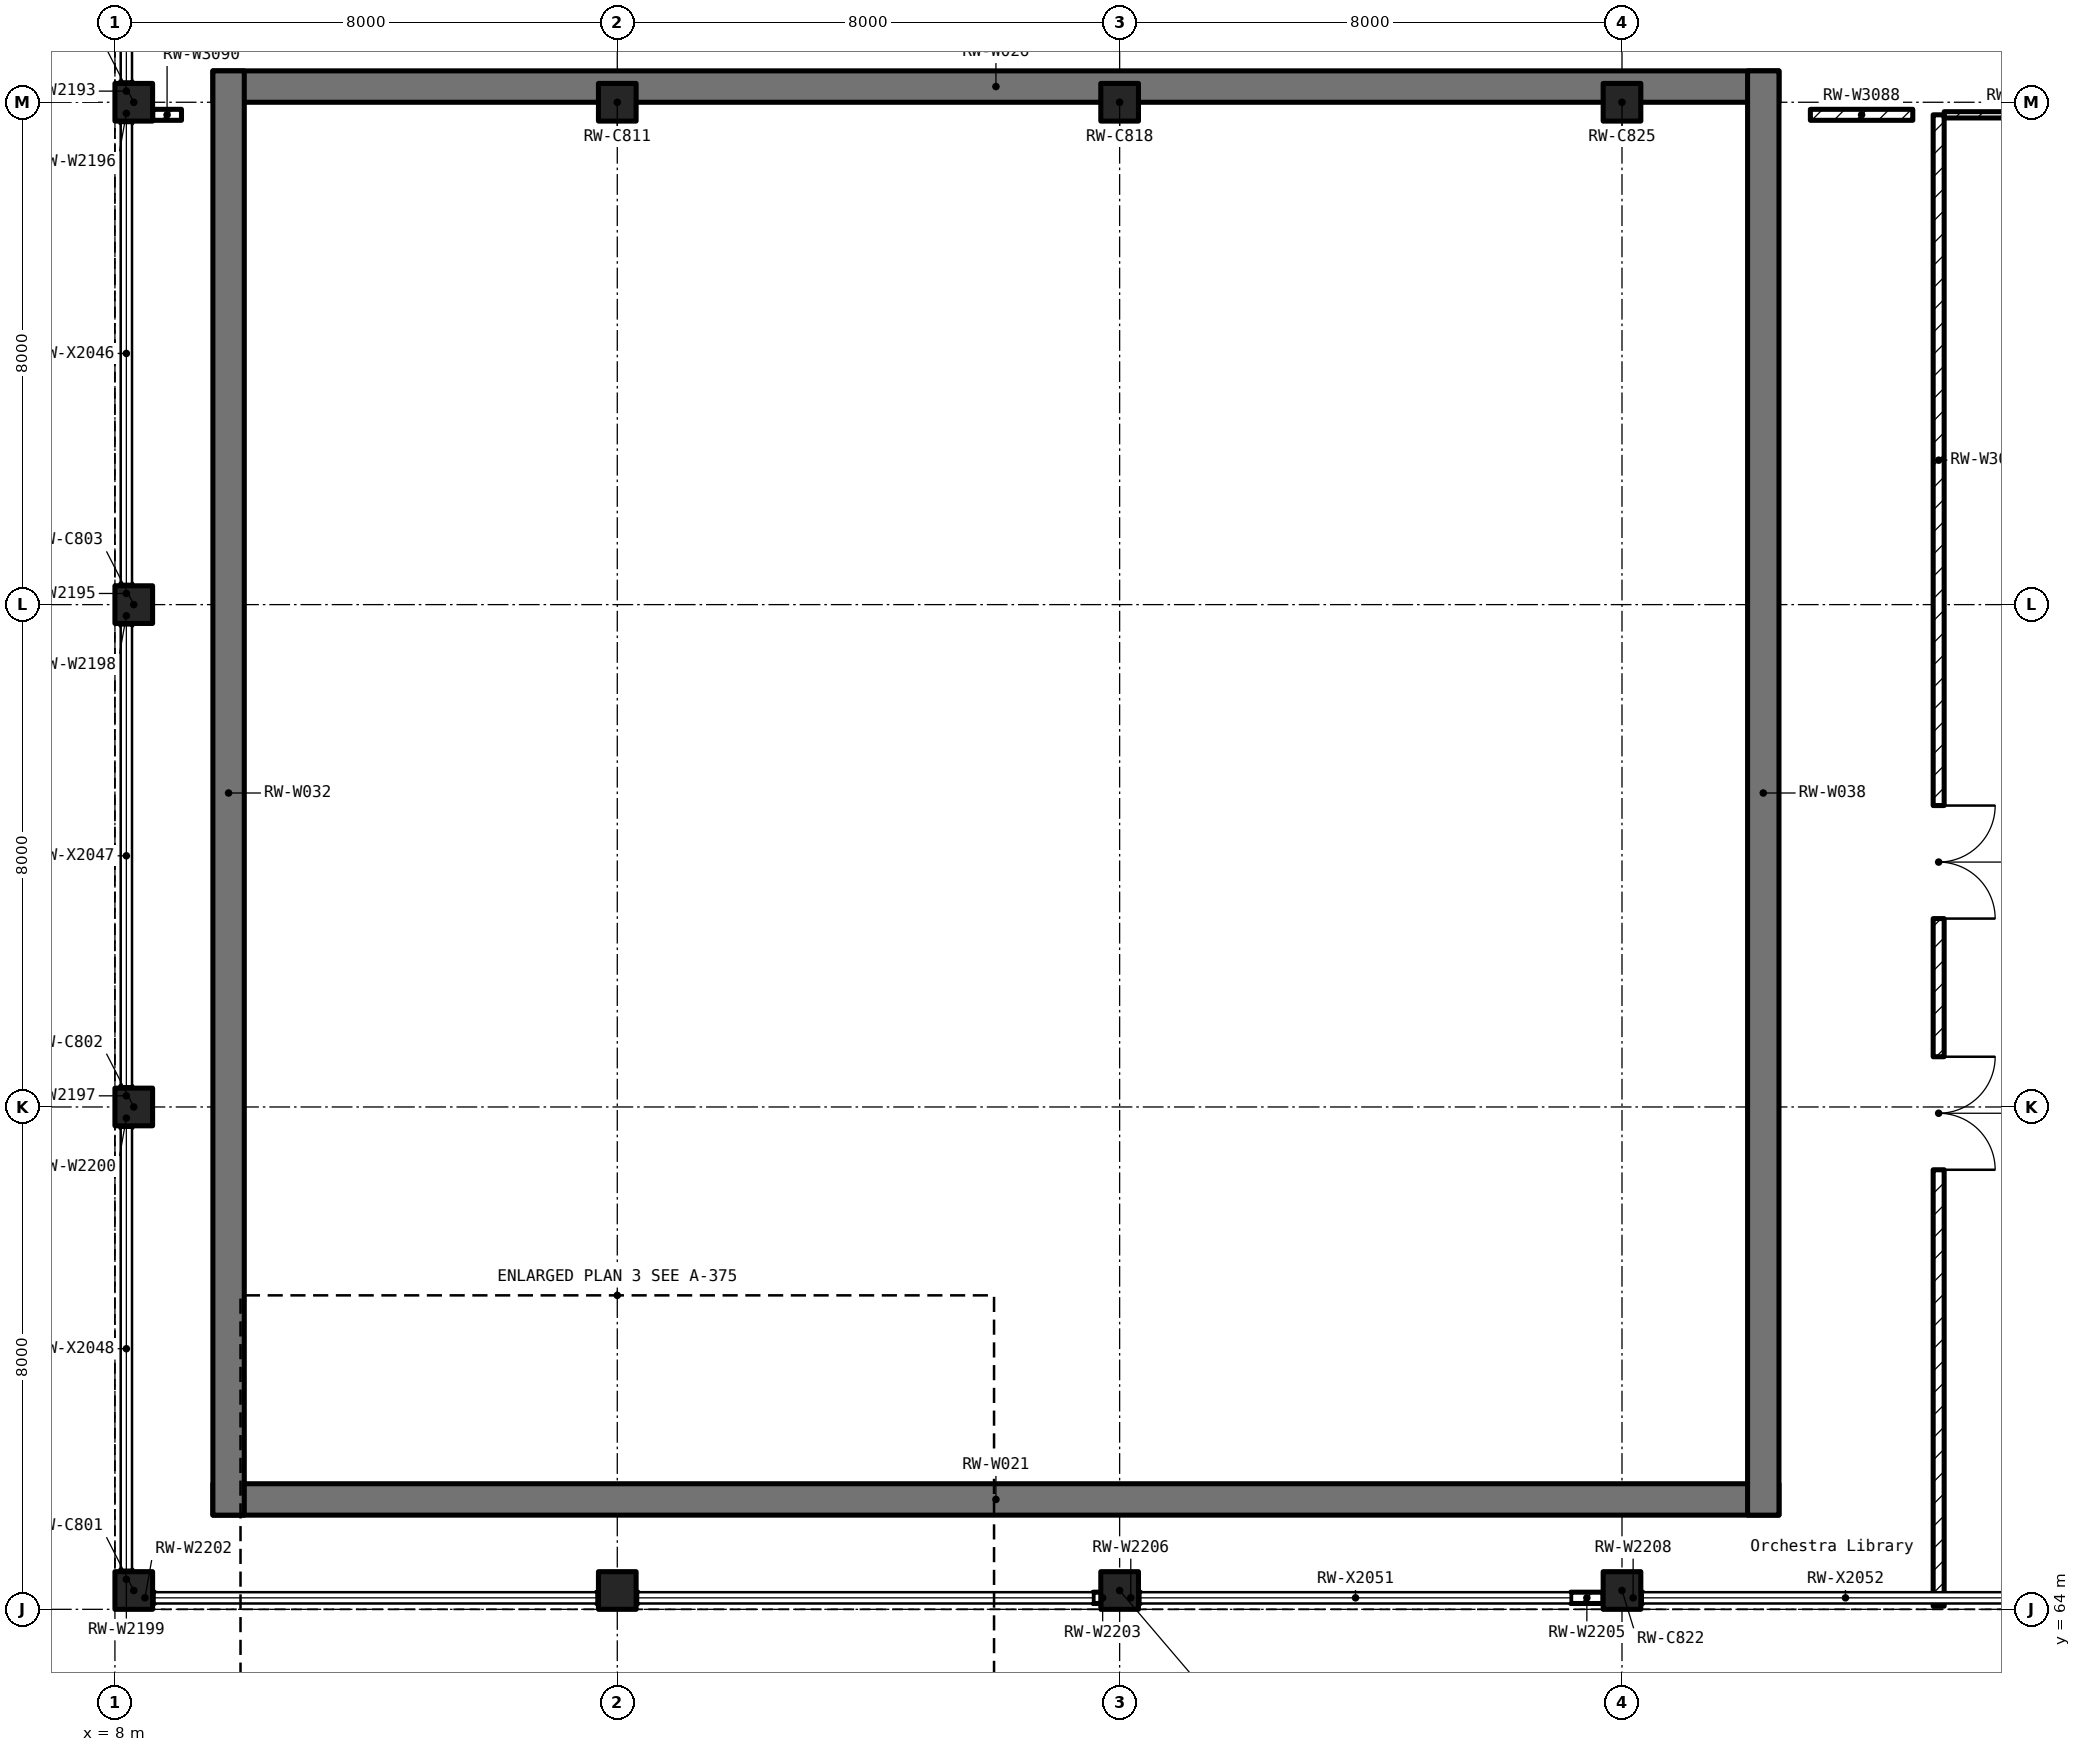
"""IFC4 building model, lengths in metres.
Left out: names, types, materials, properties, quantities, classifications, styles, units other than length and angle.
Written with IfcOpenShell. Run it as: python <this file> out.ifc"""

import sys

from ifc_helpers import new_model, si_unit, direction, frame, frame_2d, origin, origin_2d, place, context, subcontext, project, spatial, polyline, rectangle, outline, extrude, element, fill, save


model = new_model("IFC4")
c1 = context("Model", 3, precision=1e-05, world=origin(), true_north=direction((0.0, 1.0)))
c2 = subcontext(c1, "Body", "Model", "MODEL_VIEW")
j1 = project(units=[si_unit("LENGTHUNIT", "METRE"), si_unit("PLANEANGLEUNIT", "RADIAN")], contexts=[c1])
p1 = place(None, origin())
s1 = spatial("IfcSite", under=j1, at=p1, CompositionType="ELEMENT")
p2 = place(p1, origin())
s2 = spatial("IfcBuilding", under=s1, at=p2, CompositionType="ELEMENT")
p3 = place(p2, frame((0.0, 0.0, 17.0)))
s3 = spatial("IfcBuildingStorey", under=s2, at=p3, CompositionType="ELEMENT", Elevation=17.0)
for number, where, z_axis, x_axis in (
    (1, (8.3, 64.3, 0.0), (0.0, 0.0, 1.0), (1.0, 0.0, 0.0)),
    (2, (8.3, 72.0, 0.0), (0.0, 0.0, 1.0), (1.0, 0.0, 0.0)),
    (3, (8.3, 80.0, 0.0), (0.0, 0.0, 1.0), (1.0, 0.0, 0.0)),
    (4, (8.3, 88.0, 0.0), (0.0, 0.0, 1.0), (1.0, 0.0, 0.0)),
    (5, (16.0, 64.3, 0.0), (0.0, 0.0, 1.0), (1.0, 0.0, 0.0)),
    (6, (16.0, 88.0, 0.0), (0.0, 0.0, 1.0), (1.0, 0.0, 0.0)),
    (7, (24.0, 64.3, 0.0), (0.0, 0.0, 1.0), (1.0, 0.0, 0.0)),
    (8, (24.0, 88.0, 0.0), (0.0, 0.0, 1.0), (1.0, 0.0, 0.0)),
    (9, (32.0, 64.3, 0.0), (0.0, 0.0, 1.0), (1.0, 0.0, 0.0)),
    (10, (32.0, 88.0, 0.0), (0.0, 0.0, 1.0), (1.0, 0.0, 0.0)),
):
    element("IfcColumn", number, at=place(p3, frame(where, z_axis=z_axis, x_axis=x_axis)), inside=s3, PredefinedType="COLUMN", context=c2, shape_type="SweptSolid", body=[
        extrude(rectangle(XDim=0.6, YDim=0.6, at=origin_2d()), origin(), (0.0, 0.0, 1.0), 5.5),
    ])
p4 = place(p3, frame((9.56, 65.75, 0.0), z_axis=(0.0, 0.0, 1.0), x_axis=(1.0, 0.0, 0.0)))
e11 = element("IfcWall", 11, at=p4, inside=s3, PredefinedType="SHEAR", context=c2, shape_type="SweptSolid", body=[
    extrude(rectangle(XDim=24.94, YDim=0.5, at=frame_2d((12.47, 0.0))), origin(), (0.0, 0.0, 1.0), 5.35),
])
p5 = place(p3, frame((9.56, 88.25, 0.0), z_axis=(0.0, 0.0, 1.0), x_axis=(1.0, 0.0, 0.0)))
e12 = element("IfcWall", 12, at=p5, inside=s3, PredefinedType="SHEAR", context=c2, shape_type="SweptSolid", body=[
    extrude(rectangle(XDim=24.94, YDim=0.5, at=frame_2d((12.47, 0.0))), origin(), (0.0, 0.0, 1.0), 5.5),
])
for number, where, z_axis, x_axis in (
    (13, (9.81, 65.5, 0.0), (0.0, 0.0, 1.0), (0.0, 1.0, 0.0)),
    (14, (34.25, 65.5, 0.0), (0.0, 0.0, 1.0), (0.0, 1.0, 0.0)),
):
    element("IfcWall", number, at=place(p3, frame(where, z_axis=z_axis, x_axis=x_axis)), inside=s3, PredefinedType="SHEAR", context=c2, shape_type="SweptSolid", body=[
        extrude(outline(polyline([(0.0, 0.0), (23.0, 0.0), (23.0, 5.5), (6.501, 5.5), (6.5, 5.5), (6.5, 5.35), (0.0, 5.35), (0.0, 0.0)])), frame((0.0, 0.25, 0.0), z_axis=(0.0, -1.0, 0.0), x_axis=(1.0, 0.0, 0.0)), (0.0, 0.0, 1.0), 0.5),
    ])
p6 = place(p3, frame((37.043, 87.8, 0.0), z_axis=(0.0, 0.0, 1.0), x_axis=(0.0, -1.0, 0.0)))
e15 = element("IfcWall", 15, at=p6, inside=s3, PredefinedType="PARTITIONING", context=c2, shape_type="SweptSolid", body=[
    extrude(rectangle(XDim=23.75, YDim=0.175, at=frame_2d((11.875, 0.0))), origin(), (0.0, 0.0, 1.0), 4.35),
])
p7 = place(p6, frame((11.0, 0.0, 0.0)))
e16 = element("IfcOpeningElement", 16, at=p7, cuts=e15, PredefinedType="OPENING", context=c2, shape_type="SweptSolid", body=[
    extrude(rectangle(XDim=1.8, YDim=2.1, at=frame_2d((0.9, 1.05))), frame((0.0, 0.1, 0.0), z_axis=(0.0, -1.0, 0.0), x_axis=(1.0, 0.0, 0.0)), (0.0, 0.0, 1.0), 0.199),
])
p8 = place(p6, frame((15.0, 0.0, 0.0)))
e17 = element("IfcOpeningElement", 17, at=p8, cuts=e15, PredefinedType="OPENING", context=c2, shape_type="SweptSolid", body=[
    extrude(rectangle(XDim=1.8, YDim=2.1, at=frame_2d((0.9, 1.05))), frame((0.0, 0.1, 0.0), z_axis=(0.0, -1.0, 0.0), x_axis=(1.0, 0.0, 0.0)), (0.0, 0.0, 1.0), 0.199),
])
p9 = place(p3, frame((37.131, 87.8, 0.0), z_axis=(0.0, 0.0, 1.0), x_axis=(1.0, 0.0, 0.0)))
e18 = element("IfcWall", 18, at=p9, inside=s3, PredefinedType="PARTITIONING", context=c2, shape_type="SweptSolid", body=[
    extrude(rectangle(XDim=2.569, YDim=0.1, at=frame_2d((1.284, 0.0))), origin(), (0.0, 0.0, 1.0), 4.35),
])
p10 = place(p3, frame((35.0, 87.8, 0.0), z_axis=(0.0, 0.0, 1.0), x_axis=(1.0, 0.0, 0.0)))
e19 = element("IfcWall", 19, at=p10, inside=s3, PredefinedType="PARTITIONING", context=c2, shape_type="SweptSolid", body=[
    extrude(rectangle(XDim=1.631, YDim=0.175, at=frame_2d((0.815, 0.0))), origin(), (0.0, 0.0, 1.0), 4.35),
])
p11 = place(p3, frame((8.601, 87.8, 0.0), z_axis=(0.0, 0.0, 1.0), x_axis=(1.0, 0.0, 0.0)))
e20 = element("IfcWall", 20, at=p11, inside=s3, PredefinedType="PARTITIONING", context=c2, shape_type="SweptSolid", body=[
    extrude(rectangle(XDim=0.459, YDim=0.175, at=frame_2d((0.229, 0.0))), origin(), (0.0, 0.0, 1.0), 4.35),
])
for number, where, z_axis, x_axis in (
    (21, (8.182, 88.33, 0.0), (0.0, 0.0, 1.0), (0.0, -1.0, 0.0)),
    (22, (8.182, 80.33, 0.0), (0.0, 0.0, 1.0), (0.0, -1.0, 0.0)),
    (23, (8.182, 87.67, 0.0), (0.0, 0.0, 1.0), (0.0, 1.0, 0.0)),
    (24, (8.182, 72.33, 0.0), (0.0, 0.0, 1.0), (0.0, -1.0, 0.0)),
    (25, (8.182, 79.67, 0.0), (0.0, 0.0, 1.0), (0.0, 1.0, 0.0)),
):
    element("IfcWall", number, at=place(p3, frame(where, z_axis=z_axis, x_axis=x_axis)), inside=s3, PredefinedType="SOLIDWALL", context=c2, shape_type="SweptSolid", body=[
        extrude(rectangle(XDim=0.305, YDim=0.18, at=frame_2d((0.153, 0.0))), origin(), (0.0, 0.0, 1.0), 3.7),
    ])
p12 = place(p3, frame((8.182, 64.63, 0.0), z_axis=(0.0, 0.0, 1.0), x_axis=(0.0, -1.0, 0.0)))
e26 = element("IfcWall", 26, at=p12, inside=s3, PredefinedType="SOLIDWALL", context=c2, shape_type="SweptSolid", body=[
    extrude(rectangle(XDim=0.305, YDim=0.18, at=frame_2d((0.152, 0.0))), origin(), (0.0, 0.0, 1.0), 3.6),
])
for number, where, z_axis, x_axis in (
    (27, (8.182, 71.67, 0.0), (0.0, 0.0, 1.0), (0.0, 1.0, 0.0)),
    (28, (15.67, 64.183, 0.0), (0.0, 0.0, 1.0), (1.0, 0.0, 0.0)),
):
    element("IfcWall", number, at=place(p3, frame(where, z_axis=z_axis, x_axis=x_axis)), inside=s3, PredefinedType="SOLIDWALL", context=c2, shape_type="SweptSolid", body=[
        extrude(rectangle(XDim=0.305, YDim=0.18, at=frame_2d((0.153, 0.0))), origin(), (0.0, 0.0, 1.0), 3.6),
    ])
p13 = place(p3, frame((8.63, 64.183, 0.0), z_axis=(0.0, 0.0, 1.0), x_axis=(-1.0, 0.0, 0.0)))
e29 = element("IfcWall", 29, at=p13, inside=s3, PredefinedType="SOLIDWALL", context=c2, shape_type="SweptSolid", body=[
    extrude(rectangle(XDim=0.305, YDim=0.18, at=frame_2d((0.152, 0.0))), origin(), (0.0, 0.0, 1.0), 3.6),
])
for number, where, z_axis, x_axis in (
    (30, (23.577, 64.183, 0.0), (0.0, 0.0, 1.0), (1.0, 0.0, 0.0)),
    (31, (16.33, 64.183, 0.0), (0.0, 0.0, 1.0), (-1.0, 0.0, 0.0)),
):
    element("IfcWall", number, at=place(p3, frame(where, z_axis=z_axis, x_axis=x_axis)), inside=s3, PredefinedType="SOLIDWALL", context=c2, shape_type="SweptSolid", body=[
        extrude(rectangle(XDim=0.305, YDim=0.18, at=frame_2d((0.153, 0.0))), origin(), (0.0, 0.0, 1.0), 3.6),
    ])
p14 = place(p3, frame((31.183, 64.183, 0.0), z_axis=(0.0, 0.0, 1.0), x_axis=(1.0, 0.0, 0.0)))
e32 = element("IfcWall", 32, at=p14, inside=s3, PredefinedType="SOLIDWALL", context=c2, shape_type="SweptSolid", body=[
    extrude(rectangle(XDim=0.515, YDim=0.18, at=frame_2d((0.257, 0.0))), origin(), (0.0, 0.0, 1.0), 3.6),
])
for number, where, z_axis, x_axis in (
    (33, (24.33, 64.183, 0.0), (0.0, 0.0, 1.0), (-1.0, 0.0, 0.0)),
    (34, (32.33, 64.183, 0.0), (0.0, 0.0, 1.0), (-1.0, 0.0, 0.0)),
):
    element("IfcWall", number, at=place(p3, frame(where, z_axis=z_axis, x_axis=x_axis)), inside=s3, PredefinedType="SOLIDWALL", context=c2, shape_type="SweptSolid", body=[
        extrude(rectangle(XDim=0.305, YDim=0.18, at=frame_2d((0.153, 0.0))), origin(), (0.0, 0.0, 1.0), 3.6),
    ])
p15 = place(p7, origin())
e35 = element("IfcDoor", 35, at=p15, inside=s3, OperationType="DOUBLE_DOOR_SINGLE_SWING", PredefinedType="DOOR", context=c2, shape_type="SweptSolid", body=[
    extrude(rectangle(XDim=1.8, YDim=2.1, at=frame_2d((0.9, 1.05))), frame((0.0, 0.025, 0.0), z_axis=(0.0, -1.0, 0.0), x_axis=(1.0, 0.0, 0.0)), (0.0, 0.0, 1.0), 0.05),
])
fill(e16, e35)
p16 = place(p8, origin())
e36 = element("IfcDoor", 36, at=p16, inside=s3, OperationType="DOUBLE_DOOR_SINGLE_SWING", PredefinedType="DOOR", context=c2, shape_type="SweptSolid", body=[
    extrude(rectangle(XDim=1.8, YDim=2.1, at=frame_2d((0.9, 1.05))), frame((0.0, 0.025, 0.0), z_axis=(0.0, -1.0, 0.0), x_axis=(1.0, 0.0, 0.0)), (0.0, 0.0, 1.0), 0.05),
])
fill(e17, e36)
save(model, sys.argv[1])
